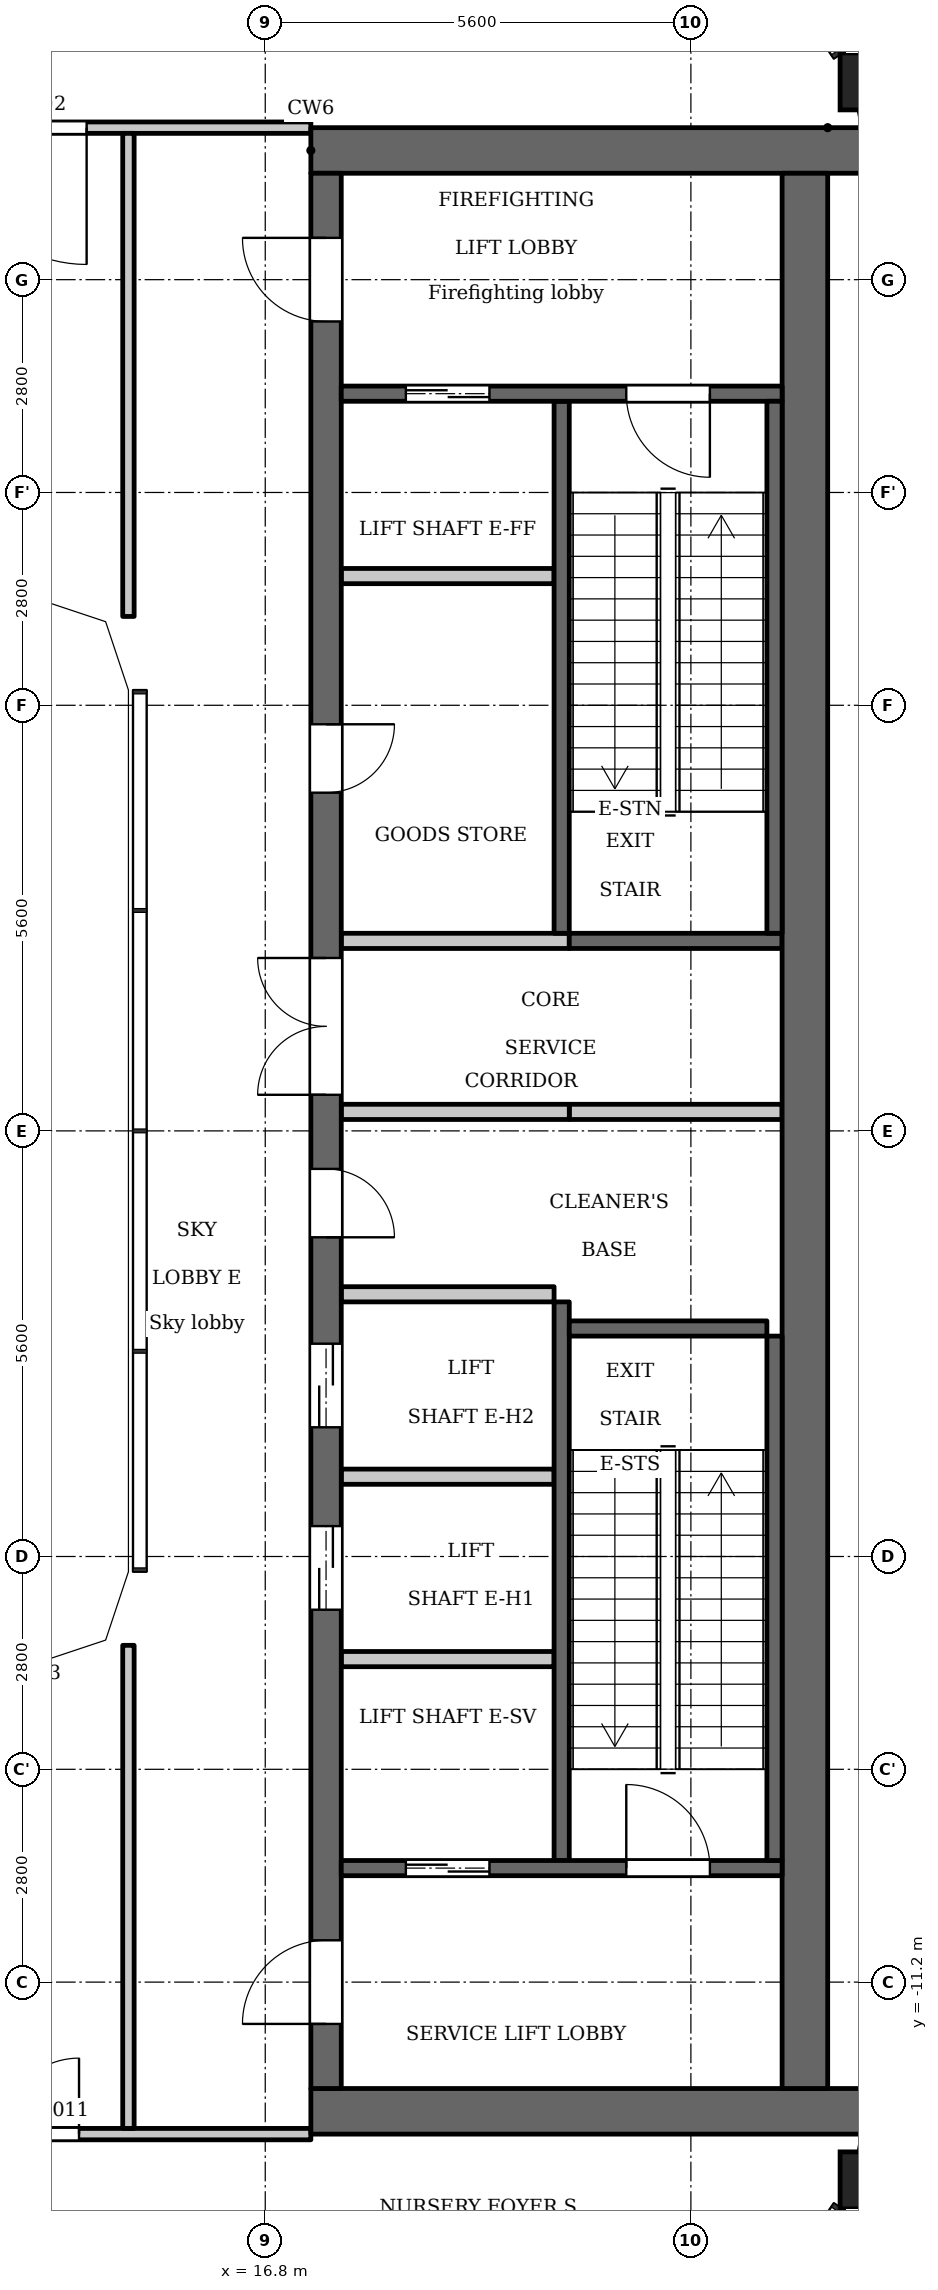
"""IFC4 building model, lengths in metres.
Left out: names, types, materials, properties, quantities, classifications, styles, units other than length and angle.
Written with IfcOpenShell. Run it as: python <this file> out.ifc"""

import sys

from ifc_helpers import new_model, si_unit, direction, frame, frame_2d, origin, origin_2d, place, context, subcontext, project, spatial, polyline, rectangle, outline, extrude, element, fill, save


model = new_model("IFC4")
c1 = context("Model", 3, precision=1e-05, world=origin(), true_north=direction((0.0, 1.0)))
c2 = subcontext(c1, "Body", "Model", "MODEL_VIEW")
j1 = project(units=[si_unit("LENGTHUNIT", "METRE"), si_unit("PLANEANGLEUNIT", "RADIAN")], contexts=[c1])
p1 = place(None, origin())
s1 = spatial("IfcSite", under=j1, at=p1, CompositionType="ELEMENT")
p2 = place(p1, origin())
s2 = spatial("IfcBuilding", under=s1, at=p2, CompositionType="ELEMENT")
p3 = place(p2, frame((0.0, 0.0, 283.7)))
s3 = spatial("IfcBuildingStorey", under=s2, at=p3, CompositionType="ELEMENT", Elevation=283.7)
for number, where, z_axis, x_axis in (
    (1, (24.738, -13.809, 0.0), (0.0, 0.0, 1.0), (1.0, 0.0, 0.0)),
    (2, (24.738, 13.809, 0.0), (0.0, 0.0, 1.0), (1.0, 0.0, 0.0)),
):
    element("IfcColumn", number, at=place(p3, frame(where, z_axis=z_axis, x_axis=x_axis)), inside=s3, PredefinedType="COLUMN", context=c2, shape_type="SweptSolid", body=[
        extrude(rectangle(XDim=0.75, YDim=0.75, at=origin_2d()), origin(), (0.0, 0.0, 1.0), 5.4),
    ])
p4 = place(p3, frame((20.7, 2.6, 0.0), z_axis=(0.0, 0.0, 1.0), x_axis=(0.0, 1.0, 0.0)))
e3 = element("IfcWall", 3, at=p4, inside=s3, PredefinedType="SHEAR", context=c2, shape_type="SweptSolid", body=[
    extrude(rectangle(XDim=7.0, YDim=0.2, at=frame_2d((3.5, 0.0))), origin(), (0.0, 0.0, 1.0), 4.95),
])
p5 = place(p3, frame((20.7, -9.6, 0.0), z_axis=(0.0, 0.0, 1.0), x_axis=(0.0, 1.0, 0.0)))
e4 = element("IfcWall", 4, at=p5, inside=s3, PredefinedType="SHEAR", context=c2, shape_type="SweptSolid", body=[
    extrude(rectangle(XDim=7.35, YDim=0.2, at=frame_2d((3.675, 0.0))), origin(), (0.0, 0.0, 1.0), 4.95),
])
p6 = place(p3, frame((20.8, 2.5, 0.0), z_axis=(0.0, 0.0, 1.0), x_axis=(1.0, 0.0, 0.0)))
e5 = element("IfcWall", 5, at=p6, inside=s3, PredefinedType="SHEAR", context=c2, shape_type="SweptSolid", body=[
    extrude(rectangle(XDim=2.8, YDim=0.2, at=frame_2d((1.4, 0.0))), origin(), (0.0, 0.0, 1.0), 4.95),
])
p7 = place(p3, frame((20.8, 0.25, 0.0), z_axis=(0.0, 0.0, 1.0), x_axis=(1.0, 0.0, 0.0)))
e6 = element("IfcWall", 6, at=p7, inside=s3, PredefinedType="PARTITIONING", context=c2, shape_type="SweptSolid", body=[
    extrude(rectangle(XDim=2.8, YDim=0.2, at=frame_2d((1.4, 0.0))), origin(), (0.0, 0.0, 1.0), 4.95),
])
for number, where, z_axis, x_axis in (
    (7, (17.4, 12.9, 0.0), (0.0, 0.0, 1.0), (1.0, 0.0, 0.0)),
    (8, (17.4, -12.9, 0.0), (0.0, 0.0, 1.0), (1.0, 0.0, 0.0)),
):
    element("IfcWall", number, at=place(p3, frame(where, z_axis=z_axis, x_axis=x_axis)), inside=s3, PredefinedType="SHEAR", context=c2, shape_type="SweptSolid", body=[
        extrude(rectangle(XDim=7.32, YDim=0.6, at=frame_2d((3.66, 0.0))), origin(), (0.0, 0.0, 1.0), 4.95),
    ])
p8 = place(p3, frame((17.6, -12.6, 0.0), z_axis=(0.0, 0.0, 1.0), x_axis=(0.0, 1.0, 0.0)))
e9 = element("IfcWall", 9, at=p8, inside=s3, PredefinedType="SHEAR", context=c2, shape_type="SweptSolid", body=[
    extrude(rectangle(XDim=25.2, YDim=0.4, at=frame_2d((12.6, 0.0))), origin(), (0.0, 0.0, 1.0), 4.95),
])
p9 = place(p8, frame((6.3, 0.0, 0.0)))
e10 = element("IfcOpeningElement", 10, at=p9, cuts=e9, PredefinedType="OPENING", context=c2, shape_type="SweptSolid", body=[
    extrude(rectangle(XDim=1.1, YDim=2.1, at=frame_2d((0.55, 1.05))), frame((0.0, 0.21, 0.0), z_axis=(0.0, -1.0, 0.0), x_axis=(1.0, 0.0, 0.0)), (0.0, 0.0, 1.0), 0.42),
])
p10 = place(p8, frame((8.7, 0.0, 0.0)))
e11 = element("IfcOpeningElement", 11, at=p10, cuts=e9, PredefinedType="OPENING", context=c2, shape_type="SweptSolid", body=[
    extrude(rectangle(XDim=1.1, YDim=2.1, at=frame_2d((0.55, 1.05))), frame((0.0, 0.21, 0.0), z_axis=(0.0, -1.0, 0.0), x_axis=(1.0, 0.0, 0.0)), (0.0, 0.0, 1.0), 0.42),
])
p11 = place(p8, frame((11.2, 0.0, 0.0)))
e12 = element("IfcOpeningElement", 12, at=p11, cuts=e9, PredefinedType="OPENING", context=c2, shape_type="SweptSolid", body=[
    extrude(rectangle(XDim=0.9, YDim=2.1, at=frame_2d((0.45, 1.05))), frame((0.0, 0.21, 0.0), z_axis=(0.0, -1.0, 0.0), x_axis=(1.0, 0.0, 0.0)), (0.0, 0.0, 1.0), 0.42),
])
p12 = place(p8, frame((17.05, 0.0, 0.0)))
e13 = element("IfcOpeningElement", 13, at=p12, cuts=e9, PredefinedType="OPENING", context=c2, shape_type="SweptSolid", body=[
    extrude(rectangle(XDim=0.9, YDim=2.1, at=frame_2d((0.45, 1.05))), frame((0.0, 0.21, 0.0), z_axis=(0.0, -1.0, 0.0), x_axis=(1.0, 0.0, 0.0)), (0.0, 0.0, 1.0), 0.42),
])
p13 = place(p8, frame((23.25, 0.0, 0.0)))
e14 = element("IfcOpeningElement", 14, at=p13, cuts=e9, PredefinedType="OPENING", context=c2, shape_type="SweptSolid", body=[
    extrude(rectangle(XDim=1.1, YDim=2.1, at=frame_2d((0.55, 1.05))), frame((0.0, 0.21, 0.0), z_axis=(0.0, -1.0, 0.0), x_axis=(1.0, 0.0, 0.0)), (0.0, 0.0, 1.0), 0.42),
])
p14 = place(p8, frame((0.85, 0.0, 0.0)))
e15 = element("IfcOpeningElement", 15, at=p14, cuts=e9, PredefinedType="OPENING", context=c2, shape_type="SweptSolid", body=[
    extrude(rectangle(XDim=1.1, YDim=2.1, at=frame_2d((0.55, 1.05))), frame((0.0, 0.21, 0.0), z_axis=(0.0, -1.0, 0.0), x_axis=(1.0, 0.0, 0.0)), (0.0, 0.0, 1.0), 0.42),
])
p15 = place(p8, frame((13.075, 0.0, 0.0)))
e16 = element("IfcOpeningElement", 16, at=p15, cuts=e9, PredefinedType="OPENING", context=c2, shape_type="SweptSolid", body=[
    extrude(rectangle(XDim=1.8, YDim=2.1, at=frame_2d((0.9, 1.05))), frame((0.0, 0.21, 0.0), z_axis=(0.0, -1.0, 0.0), x_axis=(1.0, 0.0, 0.0)), (0.0, 0.0, 1.0), 0.42),
])
p16 = place(p3, frame((23.9, -12.6, 0.0), z_axis=(0.0, 0.0, 1.0), x_axis=(0.0, 1.0, 0.0)))
e17 = element("IfcWall", 17, at=p16, inside=s3, PredefinedType="SHEAR", context=c2, shape_type="SweptSolid", body=[
    extrude(rectangle(XDim=25.2, YDim=0.6, at=frame_2d((12.6, 0.0))), origin(), (0.0, 0.0, 1.0), 4.95),
])
p17 = place(p3, frame((17.8, -9.7, 0.0), z_axis=(0.0, 0.0, 1.0), x_axis=(1.0, 0.0, 0.0)))
e18 = element("IfcWall", 18, at=p17, inside=s3, PredefinedType="SHEAR", context=c2, shape_type="SweptSolid", body=[
    extrude(rectangle(XDim=5.8, YDim=0.2, at=frame_2d((2.9, 0.0))), origin(), (0.0, 0.0, 1.0), 4.95),
])
p18 = place(p17, frame((0.85, 0.0, 0.0)))
e19 = element("IfcOpeningElement", 19, at=p18, cuts=e18, PredefinedType="OPENING", context=c2, shape_type="SweptSolid", body=[
    extrude(rectangle(XDim=1.1, YDim=2.1, at=frame_2d((0.55, 1.05))), frame((0.0, 0.11, 0.0), z_axis=(0.0, -1.0, 0.0), x_axis=(1.0, 0.0, 0.0)), (0.0, 0.0, 1.0), 0.22),
])
p19 = place(p17, frame((3.75, 0.0, 0.0)))
e20 = element("IfcOpeningElement", 20, at=p19, cuts=e18, PredefinedType="OPENING", context=c2, shape_type="SweptSolid", body=[
    extrude(rectangle(XDim=1.1, YDim=2.1, at=frame_2d((0.55, 1.05))), frame((0.0, 0.11, 0.0), z_axis=(0.0, -1.0, 0.0), x_axis=(1.0, 0.0, 0.0)), (0.0, 0.0, 1.0), 0.22),
])
for number, where, z_axis, x_axis in (
    (21, (17.8, -6.95, 0.0), (0.0, 0.0, 1.0), (1.0, 0.0, 0.0)),
    (22, (17.8, -4.55, 0.0), (0.0, 0.0, 1.0), (1.0, 0.0, 0.0)),
    (23, (17.8, -2.15, 0.0), (0.0, 0.0, 1.0), (1.0, 0.0, 0.0)),
):
    element("IfcWall", number, at=place(p3, frame(where, z_axis=z_axis, x_axis=x_axis)), inside=s3, PredefinedType="PARTITIONING", context=c2, shape_type="SweptSolid", body=[
        extrude(rectangle(XDim=2.8, YDim=0.2, at=frame_2d((1.4, 0.0))), origin(), (0.0, 0.0, 1.0), 4.95),
    ])
for number, where, z_axis, x_axis in (
    (24, (17.8, 0.25, 0.0), (0.0, 0.0, 1.0), (1.0, 0.0, 0.0)),
    (25, (17.8, 2.5, 0.0), (0.0, 0.0, 1.0), (1.0, 0.0, 0.0)),
):
    element("IfcWall", number, at=place(p3, frame(where, z_axis=z_axis, x_axis=x_axis)), inside=s3, PredefinedType="PARTITIONING", context=c2, shape_type="SweptSolid", body=[
        extrude(rectangle(XDim=3.0, YDim=0.2, at=frame_2d((1.5, 0.0))), origin(), (0.0, 0.0, 1.0), 4.95),
    ])
p20 = place(p3, frame((17.8, 7.3, 0.0), z_axis=(0.0, 0.0, 1.0), x_axis=(1.0, 0.0, 0.0)))
e26 = element("IfcWall", 26, at=p20, inside=s3, PredefinedType="PARTITIONING", context=c2, shape_type="SweptSolid", body=[
    extrude(rectangle(XDim=2.8, YDim=0.2, at=frame_2d((1.4, 0.0))), origin(), (0.0, 0.0, 1.0), 4.95),
])
p21 = place(p3, frame((17.8, 9.7, 0.0), z_axis=(0.0, 0.0, 1.0), x_axis=(1.0, 0.0, 0.0)))
e27 = element("IfcWall", 27, at=p21, inside=s3, PredefinedType="SHEAR", context=c2, shape_type="SweptSolid", body=[
    extrude(rectangle(XDim=5.8, YDim=0.2, at=frame_2d((2.9, 0.0))), origin(), (0.0, 0.0, 1.0), 4.95),
])
p22 = place(p21, frame((0.85, 0.0, 0.0)))
e28 = element("IfcOpeningElement", 28, at=p22, cuts=e27, PredefinedType="OPENING", context=c2, shape_type="SweptSolid", body=[
    extrude(rectangle(XDim=1.1, YDim=2.1, at=frame_2d((0.55, 1.05))), frame((0.0, 0.11, 0.0), z_axis=(0.0, -1.0, 0.0), x_axis=(1.0, 0.0, 0.0)), (0.0, 0.0, 1.0), 0.22),
])
p23 = place(p21, frame((3.75, 0.0, 0.0)))
e29 = element("IfcOpeningElement", 29, at=p23, cuts=e27, PredefinedType="OPENING", context=c2, shape_type="SweptSolid", body=[
    extrude(rectangle(XDim=1.1, YDim=2.1, at=frame_2d((0.55, 1.05))), frame((0.0, 0.11, 0.0), z_axis=(0.0, -1.0, 0.0), x_axis=(1.0, 0.0, 0.0)), (0.0, 0.0, 1.0), 0.22),
])
p24 = place(p3, frame((23.5, 2.6, 0.0), z_axis=(0.0, 0.0, 1.0), x_axis=(0.0, 1.0, 0.0)))
e30 = element("IfcWall", 30, at=p24, inside=s3, PredefinedType="SHEAR", context=c2, shape_type="SweptSolid", body=[
    extrude(rectangle(XDim=7.0, YDim=0.2, at=frame_2d((3.5, 0.0))), origin(), (0.0, 0.0, 1.0), 4.95),
])
p25 = place(p3, frame((23.5, -9.6, 0.0), z_axis=(0.0, 0.0, 1.0), x_axis=(0.0, 1.0, 0.0)))
e31 = element("IfcWall", 31, at=p25, inside=s3, PredefinedType="SHEAR", context=c2, shape_type="SweptSolid", body=[
    extrude(rectangle(XDim=6.9, YDim=0.2, at=frame_2d((3.45, 0.0))), origin(), (0.0, 0.0, 1.0), 4.95),
])
p26 = place(p3, frame((20.8, -2.6, 0.0), z_axis=(0.0, 0.0, 1.0), x_axis=(1.0, 0.0, 0.0)))
e32 = element("IfcWall", 32, at=p26, inside=s3, PredefinedType="SHEAR", context=c2, shape_type="SweptSolid", body=[
    extrude(rectangle(XDim=2.6, YDim=0.2, at=frame_2d((1.3, 0.0))), origin(), (0.0, 0.0, 1.0), 4.95),
])
p27 = place(p3, frame((-17.4, -13.2, 0.0), z_axis=(0.0, 0.0, 1.0), x_axis=(1.0, 0.0, 0.0)))
e33 = element("IfcWall", 33, at=p27, inside=s3, PredefinedType="PARTITIONING", context=c2, shape_type="SweptSolid", body=[
    extrude(rectangle(XDim=34.8, YDim=0.15, at=frame_2d((17.4, 0.0))), origin(), (0.0, 0.0, 1.0), 4.95),
])
p28 = place(p27, frame((0.65, 0.0, 0.0)))
e34 = element("IfcOpeningElement", 34, at=p28, cuts=e33, PredefinedType="OPENING", context=c2, shape_type="SweptSolid", body=[
    extrude(rectangle(XDim=1.2, YDim=2.1, at=frame_2d((0.6, 1.05))), frame((0.0, 0.085, 0.0), z_axis=(0.0, -1.0, 0.0), x_axis=(1.0, 0.0, 0.0)), (0.0, 0.0, 1.0), 0.17),
])
p29 = place(p27, frame((14.75, 0.0, 0.0)))
e35 = element("IfcOpeningElement", 35, at=p29, cuts=e33, PredefinedType="OPENING", context=c2, shape_type="SweptSolid", body=[
    extrude(rectangle(XDim=1.0, YDim=2.1, at=frame_2d((0.5, 1.05))), frame((0.0, 0.085, 0.0), z_axis=(0.0, -1.0, 0.0), x_axis=(1.0, 0.0, 0.0)), (0.0, 0.0, 1.0), 0.17),
])
p30 = place(p27, frame((17.0, 0.0, 0.0)))
e36 = element("IfcOpeningElement", 36, at=p30, cuts=e33, PredefinedType="OPENING", context=c2, shape_type="SweptSolid", body=[
    extrude(rectangle(XDim=1.0, YDim=2.1, at=frame_2d((0.5, 1.05))), frame((0.0, 0.085, 0.0), z_axis=(0.0, -1.0, 0.0), x_axis=(1.0, 0.0, 0.0)), (0.0, 0.0, 1.0), 0.17),
])
p31 = place(p27, frame((30.75, 0.0, 0.0)))
e37 = element("IfcOpeningElement", 37, at=p31, cuts=e33, PredefinedType="OPENING", context=c2, shape_type="SweptSolid", body=[
    extrude(rectangle(XDim=1.0, YDim=2.1, at=frame_2d((0.5, 1.05))), frame((0.0, 0.085, 0.0), z_axis=(0.0, -1.0, 0.0), x_axis=(1.0, 0.0, 0.0)), (0.0, 0.0, 1.0), 0.17),
])
p32 = place(p3, frame((-17.4, 13.2, 0.0), z_axis=(0.0, 0.0, 1.0), x_axis=(1.0, 0.0, 0.0)))
e38 = element("IfcWall", 38, at=p32, inside=s3, PredefinedType="PARTITIONING", context=c2, shape_type="SweptSolid", body=[
    extrude(rectangle(XDim=34.8, YDim=0.15, at=frame_2d((17.4, 0.0))), origin(), (0.0, 0.0, 1.0), 4.95),
])
p33 = place(p32, frame((0.55, 0.0, 0.0)))
e39 = element("IfcOpeningElement", 39, at=p33, cuts=e38, PredefinedType="OPENING", context=c2, shape_type="SweptSolid", body=[
    extrude(rectangle(XDim=1.2, YDim=2.1, at=frame_2d((0.6, 1.05))), frame((0.0, 0.085, 0.0), z_axis=(0.0, -1.0, 0.0), x_axis=(1.0, 0.0, 0.0)), (0.0, 0.0, 1.0), 0.17),
])
p34 = place(p32, frame((30.05, 0.0, 0.0)))
e40 = element("IfcOpeningElement", 40, at=p34, cuts=e38, PredefinedType="OPENING", context=c2, shape_type="SweptSolid", body=[
    extrude(rectangle(XDim=1.8, YDim=2.1, at=frame_2d((0.9, 1.05))), frame((0.0, 0.085, 0.0), z_axis=(0.0, -1.0, 0.0), x_axis=(1.0, 0.0, 0.0)), (0.0, 0.0, 1.0), 0.17),
])
for number, where, z_axis, x_axis in (
    (41, (15.0, -13.125, 0.0), (0.0, 0.0, 1.0), (0.0, 1.0, 0.0)),
    (42, (15.0, 6.769, 0.0), (0.0, 0.0, 1.0), (0.0, 1.0, 0.0)),
):
    element("IfcWall", number, at=place(p3, frame(where, z_axis=z_axis, x_axis=x_axis)), inside=s3, PredefinedType="PARTITIONING", context=c2, shape_type="SweptSolid", body=[
        extrude(rectangle(XDim=6.356, YDim=0.15, at=frame_2d((3.178, 0.0))), origin(), (0.0, 0.0, 1.0), 4.95),
    ])
p35 = place(p3, origin())
e43 = element("IfcWall", 43, at=p35, inside=s3, PredefinedType="SOLIDWALL", context=c2, shape_type="SweptSolid", body=[
    extrude(outline(polyline([(14.937, 6.937), (13.849, 7.3), (13.8, 7.3), (13.8, 7.0), (14.7, 6.7), (15.0, 5.8), (15.3, 5.8), (15.3, 5.849), (14.937, 6.937)])), origin(), (0.0, 0.0, 1.0), 4.95),
])
e44 = element("IfcWall", 44, at=p35, inside=s3, PredefinedType="SOLIDWALL", context=c2, shape_type="SweptSolid", body=[
    extrude(outline(polyline([(14.937, -6.937), (15.3, -5.849), (15.3, -5.8), (15.0, -5.8), (14.7, -6.7), (13.8, -7.0), (13.8, -7.3), (13.849, -7.3), (14.937, -6.937)])), origin(), (0.0, 0.0, 1.0), 4.95),
])
p36 = place(p18, origin())
e45 = element("IfcDoor", 45, at=p36, inside=s3, OperationType="DOUBLE_DOOR_SLIDING", PredefinedType="DOOR", context=c2, shape_type="SweptSolid", body=[
    extrude(rectangle(XDim=1.1, YDim=2.1, at=frame_2d((0.55, 1.05))), frame((0.0, 0.025, 0.0), z_axis=(0.0, -1.0, 0.0), x_axis=(1.0, 0.0, 0.0)), (0.0, 0.0, 1.0), 0.05),
])
fill(e19, e45)
p37 = place(p9, origin())
e46 = element("IfcDoor", 46, at=p37, inside=s3, OperationType="DOUBLE_DOOR_SLIDING", PredefinedType="DOOR", context=c2, shape_type="SweptSolid", body=[
    extrude(rectangle(XDim=1.1, YDim=2.1, at=frame_2d((0.55, 1.05))), frame((0.0, 0.025, 0.0), z_axis=(0.0, -1.0, 0.0), x_axis=(1.0, 0.0, 0.0)), (0.0, 0.0, 1.0), 0.05),
])
fill(e10, e46)
p38 = place(p10, origin())
e47 = element("IfcDoor", 47, at=p38, inside=s3, OperationType="DOUBLE_DOOR_SLIDING", PredefinedType="DOOR", context=c2, shape_type="SweptSolid", body=[
    extrude(rectangle(XDim=1.1, YDim=2.1, at=frame_2d((0.55, 1.05))), frame((0.0, 0.025, 0.0), z_axis=(0.0, -1.0, 0.0), x_axis=(1.0, 0.0, 0.0)), (0.0, 0.0, 1.0), 0.05),
])
fill(e11, e47)
p39 = place(p11, origin())
e48 = element("IfcDoor", 48, at=p39, inside=s3, OperationType="SINGLE_SWING_LEFT", PredefinedType="DOOR", context=c2, shape_type="SweptSolid", body=[
    extrude(rectangle(XDim=0.9, YDim=2.1, at=frame_2d((0.45, 1.05))), frame((0.0, 0.025, 0.0), z_axis=(0.0, -1.0, 0.0), x_axis=(1.0, 0.0, 0.0)), (0.0, 0.0, 1.0), 0.05),
])
fill(e12, e48)
p40 = place(p12, origin())
e49 = element("IfcDoor", 49, at=p40, inside=s3, OperationType="SINGLE_SWING_RIGHT", PredefinedType="DOOR", context=c2, shape_type="SweptSolid", body=[
    extrude(rectangle(XDim=0.9, YDim=2.1, at=frame_2d((0.45, 1.05))), frame((0.0, 0.025, 0.0), z_axis=(0.0, -1.0, 0.0), x_axis=(1.0, 0.0, 0.0)), (0.0, 0.0, 1.0), 0.05),
])
fill(e13, e49)
p41 = place(p22, origin())
e50 = element("IfcDoor", 50, at=p41, inside=s3, OperationType="DOUBLE_DOOR_SLIDING", PredefinedType="DOOR", context=c2, shape_type="SweptSolid", body=[
    extrude(rectangle(XDim=1.1, YDim=2.1, at=frame_2d((0.55, 1.05))), frame((0.0, 0.025, 0.0), z_axis=(0.0, -1.0, 0.0), x_axis=(1.0, 0.0, 0.0)), (0.0, 0.0, 1.0), 0.05),
])
fill(e28, e50)
p42 = place(p13, origin())
e51 = element("IfcDoor", 51, at=p42, inside=s3, OperationType="SINGLE_SWING_LEFT", PredefinedType="DOOR", context=c2, shape_type="SweptSolid", body=[
    extrude(rectangle(XDim=1.1, YDim=2.1, at=frame_2d((0.55, 1.05))), frame((0.0, 0.025, 0.0), z_axis=(0.0, -1.0, 0.0), x_axis=(1.0, 0.0, 0.0)), (0.0, 0.0, 1.0), 0.05),
])
fill(e14, e51)
p43 = place(p14, origin())
e52 = element("IfcDoor", 52, at=p43, inside=s3, OperationType="SINGLE_SWING_RIGHT", PredefinedType="DOOR", context=c2, shape_type="SweptSolid", body=[
    extrude(rectangle(XDim=1.1, YDim=2.1, at=frame_2d((0.55, 1.05))), frame((0.0, 0.025, 0.0), z_axis=(0.0, -1.0, 0.0), x_axis=(1.0, 0.0, 0.0)), (0.0, 0.0, 1.0), 0.05),
])
fill(e15, e52)
p44 = place(p23, origin())
e53 = element("IfcDoor", 53, at=p44, inside=s3, OperationType="SINGLE_SWING_RIGHT", PredefinedType="DOOR", context=c2, shape_type="SweptSolid", body=[
    extrude(rectangle(XDim=1.1, YDim=2.1, at=frame_2d((0.55, 1.05))), frame((0.0, 0.025, 0.0), z_axis=(0.0, -1.0, 0.0), x_axis=(1.0, 0.0, 0.0)), (0.0, 0.0, 1.0), 0.05),
])
fill(e29, e53)
p45 = place(p19, origin())
e54 = element("IfcDoor", 54, at=p45, inside=s3, OperationType="SINGLE_SWING_RIGHT", PredefinedType="DOOR", context=c2, shape_type="SweptSolid", body=[
    extrude(rectangle(XDim=1.1, YDim=2.1, at=frame_2d((0.55, 1.05))), frame((0.0, 0.025, 0.0), z_axis=(0.0, -1.0, 0.0), x_axis=(1.0, 0.0, 0.0)), (0.0, 0.0, 1.0), 0.05),
])
fill(e20, e54)
p46 = place(p15, origin())
e55 = element("IfcDoor", 55, at=p46, inside=s3, OperationType="DOUBLE_DOOR_SINGLE_SWING", PredefinedType="DOOR", context=c2, shape_type="SweptSolid", body=[
    extrude(rectangle(XDim=1.8, YDim=2.1, at=frame_2d((0.9, 1.05))), frame((0.0, 0.025, 0.0), z_axis=(0.0, -1.0, 0.0), x_axis=(1.0, 0.0, 0.0)), (0.0, 0.0, 1.0), 0.05),
])
fill(e16, e55)
p47 = place(p34, origin())
e56 = element("IfcDoor", 56, at=p47, inside=s3, OperationType="SINGLE_SWING_RIGHT", PredefinedType="DOOR", context=c2, shape_type="SweptSolid", body=[
    extrude(rectangle(XDim=1.8, YDim=2.1, at=frame_2d((0.9, 1.05))), frame((0.0, 0.025, 0.0), z_axis=(0.0, -1.0, 0.0), x_axis=(1.0, 0.0, 0.0)), (0.0, 0.0, 1.0), 0.05),
])
fill(e40, e56)
p48 = place(p31, origin())
e57 = element("IfcDoor", 57, at=p48, inside=s3, OperationType="SINGLE_SWING_LEFT", PredefinedType="DOOR", context=c2, shape_type="SweptSolid", body=[
    extrude(rectangle(XDim=1.0, YDim=2.1, at=frame_2d((0.5, 1.05))), frame((0.0, 0.025, 0.0), z_axis=(0.0, -1.0, 0.0), x_axis=(1.0, 0.0, 0.0)), (0.0, 0.0, 1.0), 0.05),
])
fill(e37, e57)
save(model, sys.argv[1])
